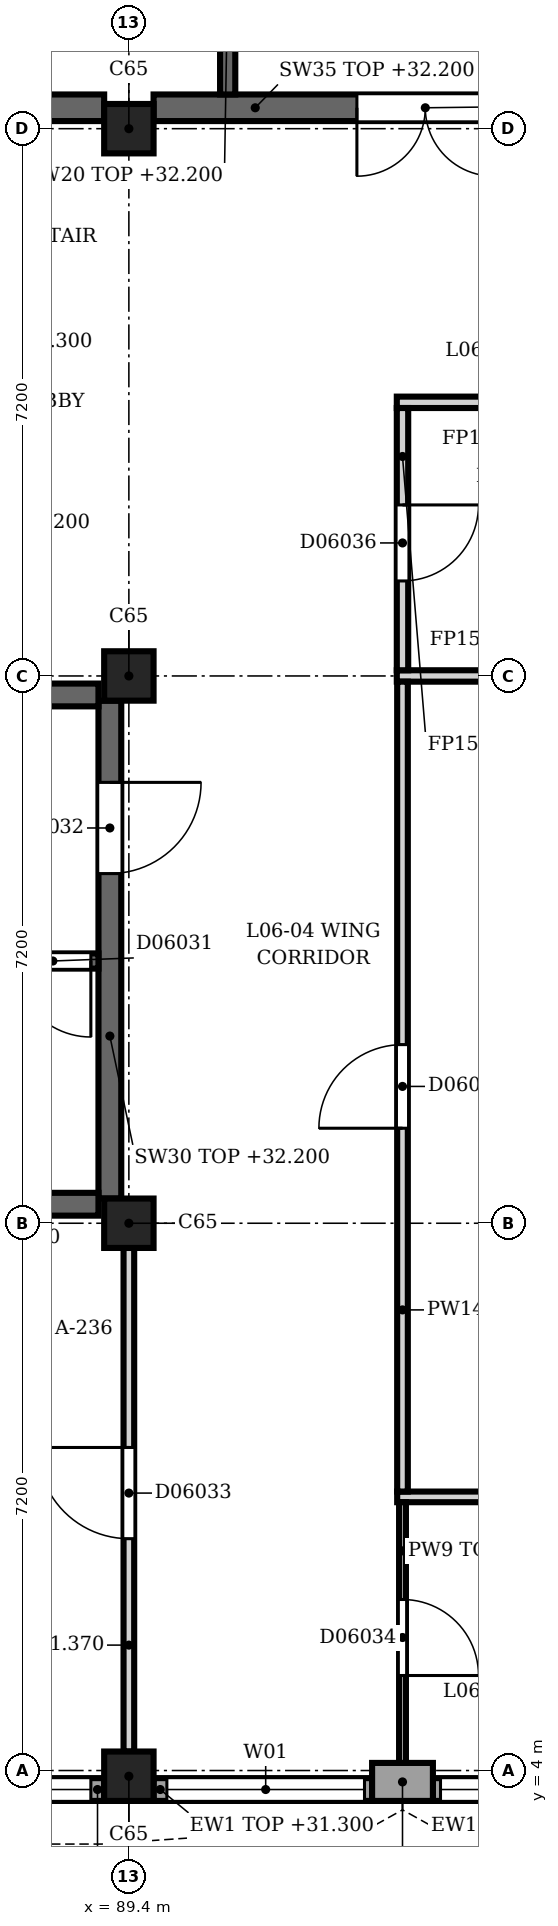
"""IFC4 building model, lengths in metres.
Left out: names, types, materials, properties, quantities, classifications, styles, units other than length and angle.
Written with IfcOpenShell. Run it as: python <this file> out.ifc"""

import sys

from ifc_helpers import new_model, si_unit, direction, frame, frame_2d, origin, origin_2d, place, context, subcontext, project, spatial, rectangle, extrude, element, fill, save


model = new_model("IFC4")
c1 = context("Model", 3, precision=1e-05, world=origin(), true_north=direction((0.0, 1.0)))
c2 = subcontext(c1, "Body", "Model", "MODEL_VIEW")
j1 = project(units=[si_unit("LENGTHUNIT", "METRE"), si_unit("PLANEANGLEUNIT", "RADIAN")], contexts=[c1])
p1 = place(None, origin())
s1 = spatial("IfcSite", under=j1, at=p1, CompositionType="ELEMENT")
p2 = place(p1, origin())
s2 = spatial("IfcBuilding", under=s1, at=p2, CompositionType="ELEMENT")
p3 = place(p2, frame((0.0, 0.0, 27.9)))
s3 = spatial("IfcBuildingStorey", under=s2, at=p3, CompositionType="ELEMENT", Elevation=27.9)
for number, where, z_axis, x_axis in (
    (1, (89.4, 3.925, 0.0), (0.0, 0.0, 1.0), (1.0, 0.0, 0.0)),
    (2, (89.4, 11.2, 0.0), (0.0, 0.0, 1.0), (1.0, 0.0, 0.0)),
    (3, (89.4, 18.4, 0.0), (0.0, 0.0, 1.0), (1.0, 0.0, 0.0)),
    (4, (89.4, 25.6, 0.0), (0.0, 0.0, 1.0), (1.0, 0.0, 0.0)),
):
    element("IfcColumn", number, at=place(p3, frame(where, z_axis=z_axis, x_axis=x_axis)), inside=s3, PredefinedType="COLUMN", context=c2, shape_type="SweptSolid", body=[
        extrude(rectangle(XDim=0.65, YDim=0.65, at=origin_2d()), origin(), (0.0, 0.0, 1.0), 4.5),
    ])
p4 = place(p3, frame((93.4, 3.85, 0.0), z_axis=(0.0, 0.0, 1.0), x_axis=(-1.0, 0.0, 0.0)))
e5 = element("IfcWall", 5, at=p4, inside=s3, PredefinedType="SOLIDWALL", context=c2, shape_type="SweptSolid", body=[
    extrude(rectangle(XDim=0.8, YDim=0.5, at=frame_2d((0.4, 0.0))), origin(), (0.0, 0.0, 1.0), 3.4),
])
p5 = place(p3, frame((96.275, 3.75, 0.0), z_axis=(0.0, 0.0, 1.0), x_axis=(-1.0, 0.0, 0.0)))
e6 = element("IfcWall", 6, at=p5, inside=s3, PredefinedType="SOLIDWALL", context=c2, shape_type="SweptSolid", body=[
    extrude(rectangle(XDim=2.875, YDim=0.3, at=frame_2d((1.438, 0.0))), origin(), (0.0, 0.0, 1.0), 3.4),
])
p6 = place(p5, frame((0.175, 0.0, 0.9)))
e7 = element("IfcOpeningElement", 7, at=p6, cuts=e6, PredefinedType="OPENING", context=c2, shape_type="SweptSolid", body=[
    extrude(rectangle(XDim=2.6, YDim=2.4, at=frame_2d((1.3, 1.2))), frame((0.0, 0.16, 0.0), z_axis=(0.0, -1.0, 0.0), x_axis=(1.0, 0.0, 0.0)), (0.0, 0.0, 1.0), 0.32),
])
p7 = place(p3, frame((92.6, 3.75, 0.0), z_axis=(0.0, 0.0, 1.0), x_axis=(-1.0, 0.0, 0.0)))
e8 = element("IfcWall", 8, at=p7, inside=s3, PredefinedType="SOLIDWALL", context=c2, shape_type="SweptSolid", body=[
    extrude(rectangle(XDim=2.875, YDim=0.3, at=frame_2d((1.438, 0.0))), origin(), (0.0, 0.0, 1.0), 3.4),
])
p8 = place(p7, frame((0.1, 0.0, 0.9)))
e9 = element("IfcOpeningElement", 9, at=p8, cuts=e8, PredefinedType="OPENING", context=c2, shape_type="SweptSolid", body=[
    extrude(rectangle(XDim=2.6, YDim=2.4, at=frame_2d((1.3, 1.2))), frame((0.0, 0.16, 0.0), z_axis=(0.0, -1.0, 0.0), x_axis=(1.0, 0.0, 0.0)), (0.0, 0.0, 1.0), 0.32),
])
p9 = place(p3, frame((89.075, 3.75, 0.0), z_axis=(0.0, 0.0, 1.0), x_axis=(-1.0, 0.0, 0.0)))
e10 = element("IfcWall", 10, at=p9, inside=s3, PredefinedType="SOLIDWALL", context=c2, shape_type="SweptSolid", body=[
    extrude(rectangle(XDim=2.875, YDim=0.3, at=frame_2d((1.438, 0.0))), origin(), (0.0, 0.0, 1.0), 3.4),
])
p10 = place(p9, frame((0.175, 0.0, 0.9)))
e11 = element("IfcOpeningElement", 11, at=p10, cuts=e10, PredefinedType="OPENING", context=c2, shape_type="SweptSolid", body=[
    extrude(rectangle(XDim=2.6, YDim=2.4, at=frame_2d((1.3, 1.2))), frame((0.0, 0.16, 0.0), z_axis=(0.0, -1.0, 0.0), x_axis=(1.0, 0.0, 0.0)), (0.0, 0.0, 1.0), 0.32),
])
p11 = place(p3, frame((82.45, 25.875, 0.0), z_axis=(0.0, 0.0, 1.0), x_axis=(1.0, 0.0, 0.0)))
e12 = element("IfcWall", 12, at=p11, inside=s3, PredefinedType="SHEAR", context=c2, shape_type="SweptSolid", body=[
    extrude(rectangle(XDim=6.625, YDim=0.35, at=frame_2d((3.312, 0.0))), origin(), (0.0, 0.0, 1.0), 4.3),
])
p12 = place(p11, frame((3.95, 0.0, 0.0)))
e13 = element("IfcOpeningElement", 13, at=p12, cuts=e12, PredefinedType="OPENING", context=c2, shape_type="SweptSolid", body=[
    extrude(rectangle(XDim=1.2, YDim=2.1, at=frame_2d((0.6, 1.05))), frame((0.0, 0.185, 0.0), z_axis=(0.0, -1.0, 0.0), x_axis=(1.0, 0.0, 0.0)), (0.0, 0.0, 1.0), 0.37),
])
p13 = place(p3, frame((89.725, 25.875, 0.0), z_axis=(0.0, 0.0, 1.0), x_axis=(1.0, 0.0, 0.0)))
e14 = element("IfcWall", 14, at=p13, inside=s3, PredefinedType="SHEAR", context=c2, shape_type="SweptSolid", body=[
    extrude(rectangle(XDim=6.55, YDim=0.35, at=frame_2d((3.275, 0.0))), origin(), (0.0, 0.0, 1.0), 4.3),
])
p14 = place(p13, frame((2.675, 0.0, 0.0)))
e15 = element("IfcOpeningElement", 15, at=p14, cuts=e14, PredefinedType="OPENING", context=c2, shape_type="SweptSolid", body=[
    extrude(rectangle(XDim=1.8, YDim=2.1, at=frame_2d((0.9, 1.05))), frame((0.0, 0.185, 0.0), z_axis=(0.0, -1.0, 0.0), x_axis=(1.0, 0.0, 0.0)), (0.0, 0.0, 1.0), 0.37),
])
p15 = place(p3, frame((90.7, 26.05, 0.0), z_axis=(0.0, 0.0, 1.0), x_axis=(0.0, 1.0, 0.0)))
e16 = element("IfcWall", 16, at=p15, inside=s3, PredefinedType="SHEAR", context=c2, shape_type="SweptSolid", body=[
    extrude(rectangle(XDim=3.05, YDim=0.2, at=frame_2d((1.525, 0.0))), origin(), (0.0, 0.0, 1.0), 4.3),
])
p16 = place(p3, frame((89.15, 11.525, 0.0), z_axis=(0.0, 0.0, 1.0), x_axis=(0.0, 1.0, 0.0)))
e17 = element("IfcWall", 17, at=p16, inside=s3, PredefinedType="SHEAR", context=c2, shape_type="SweptSolid", body=[
    extrude(rectangle(XDim=6.55, YDim=0.3, at=frame_2d((3.275, 0.0))), origin(), (0.0, 0.0, 1.0), 4.3),
])
p17 = place(p16, frame((4.275, 0.0, 0.0)))
e18 = element("IfcOpeningElement", 18, at=p17, cuts=e17, PredefinedType="OPENING", context=c2, shape_type="SweptSolid", body=[
    extrude(rectangle(XDim=1.2, YDim=2.1, at=frame_2d((0.6, 1.05))), frame((0.0, 0.16, 0.0), z_axis=(0.0, -1.0, 0.0), x_axis=(1.0, 0.0, 0.0)), (0.0, 0.0, 1.0), 0.32),
])
for number, where, z_axis, x_axis in (
    (19, (82.6, 11.45, 0.0), (0.0, 0.0, 1.0), (1.0, 0.0, 0.0)),
    (20, (82.6, 18.15, 0.0), (0.0, 0.0, 1.0), (1.0, 0.0, 0.0)),
):
    element("IfcWall", number, at=place(p3, frame(where, z_axis=z_axis, x_axis=x_axis)), inside=s3, PredefinedType="SHEAR", context=c2, shape_type="SweptSolid", body=[
        extrude(rectangle(XDim=6.4, YDim=0.3, at=frame_2d((3.2, 0.0))), origin(), (0.0, 0.0, 1.0), 4.3),
    ])
p18 = place(p3, frame((89.0, 14.65, 0.0), z_axis=(0.0, 0.0, 1.0), x_axis=(-1.0, 0.0, 0.0)))
e21 = element("IfcWall", 21, at=p18, inside=s3, PredefinedType="SHEAR", context=c2, shape_type="SweptSolid", body=[
    extrude(rectangle(XDim=6.4, YDim=0.2, at=frame_2d((3.2, 0.0))), origin(), (0.0, 0.0, 1.0), 4.3),
])
p19 = place(p18, frame((0.1, 0.0, 0.0)))
e22 = element("IfcOpeningElement", 22, at=p19, cuts=e21, PredefinedType="OPENING", context=c2, shape_type="SweptSolid", body=[
    extrude(rectangle(XDim=1.0, YDim=2.1, at=frame_2d((0.5, 1.05))), frame((0.0, 0.11, 0.0), z_axis=(0.0, -1.0, 0.0), x_axis=(1.0, 0.0, 0.0)), (0.0, 0.0, 1.0), 0.22),
])
p20 = place(p3, frame((92.93, 7.6, 0.0), z_axis=(0.0, 0.0, 1.0), x_axis=(1.0, 0.0, 0.0)))
e23 = element("IfcWall", 23, at=p20, inside=s3, PredefinedType="PARTITIONING", context=c2, shape_type="SweptSolid", body=[
    extrude(rectangle(XDim=3.74, YDim=0.14, at=frame_2d((1.87, 0.0))), origin(), (0.0, 0.0, 1.0), 4.3),
])
p21 = place(p3, frame((92.925, 18.4, 0.0), z_axis=(0.0, 0.0, 1.0), x_axis=(1.0, 0.0, 0.0)))
e24 = element("IfcWall", 24, at=p21, inside=s3, PredefinedType="PARTITIONING", context=c2, shape_type="SweptSolid", body=[
    extrude(rectangle(XDim=3.35, YDim=0.15, at=frame_2d((1.675, 0.0))), origin(), (0.0, 0.0, 1.0), 3.47),
])
p22 = place(p3, frame((92.925, 22.0, 0.0), z_axis=(0.0, 0.0, 1.0), x_axis=(1.0, 0.0, 0.0)))
e25 = element("IfcWall", 25, at=p22, inside=s3, PredefinedType="PARTITIONING", context=c2, shape_type="SweptSolid", body=[
    extrude(rectangle(XDim=3.675, YDim=0.15, at=frame_2d((1.837, 0.0))), origin(), (0.0, 0.0, 1.0), 4.3),
])
p23 = place(p3, frame((89.4, 4.25, 0.0), z_axis=(0.0, 0.0, 1.0), x_axis=(0.0, 1.0, 0.0)))
e26 = element("IfcWall", 26, at=p23, inside=s3, PredefinedType="PARTITIONING", context=c2, shape_type="SweptSolid", body=[
    extrude(rectangle(XDim=6.625, YDim=0.14, at=frame_2d((3.312, 0.0))), origin(), (0.0, 0.0, 1.0), 3.47),
])
p24 = place(p23, frame((2.8, 0.0, 0.0)))
e27 = element("IfcOpeningElement", 27, at=p24, cuts=e26, PredefinedType="OPENING", context=c2, shape_type="SweptSolid", body=[
    extrude(rectangle(XDim=1.2, YDim=2.1, at=frame_2d((0.6, 1.05))), frame((0.0, 0.08, 0.0), z_axis=(0.0, -1.0, 0.0), x_axis=(1.0, 0.0, 0.0)), (0.0, 0.0, 1.0), 0.16),
])
p25 = place(p3, frame((93.0, 7.53, 0.0), z_axis=(0.0, 0.0, 1.0), x_axis=(0.0, -1.0, 0.0)))
e28 = element("IfcWall", 28, at=p25, inside=s3, PredefinedType="PARTITIONING", context=c2, shape_type="SweptSolid", body=[
    extrude(rectangle(XDim=3.43, YDim=0.09, at=frame_2d((1.715, 0.0))), origin(), (0.0, 0.0, 1.0), 3.87),
])
p26 = place(p25, frame((1.28, 0.0, 0.0)))
e29 = element("IfcOpeningElement", 29, at=p26, cuts=e28, PredefinedType="OPENING", context=c2, shape_type="SweptSolid", body=[
    extrude(rectangle(XDim=1.0, YDim=2.2, at=frame_2d((0.5, 1.1))), frame((0.0, 0.055, 0.0), z_axis=(0.0, -1.0, 0.0), x_axis=(1.0, 0.0, 0.0)), (0.0, 0.0, 1.0), 0.11),
])
p27 = place(p3, frame((93.0, 18.325, 0.0), z_axis=(0.0, 0.0, 1.0), x_axis=(0.0, -1.0, 0.0)))
e30 = element("IfcWall", 30, at=p27, inside=s3, PredefinedType="PARTITIONING", context=c2, shape_type="SweptSolid", body=[
    extrude(rectangle(XDim=10.655, YDim=0.14, at=frame_2d((5.328, 0.0))), origin(), (0.0, 0.0, 1.0), 3.87),
])
p28 = place(p27, frame((4.775, 0.0, 0.0)))
e31 = element("IfcOpeningElement", 31, at=p28, cuts=e30, PredefinedType="OPENING", context=c2, shape_type="SweptSolid", body=[
    extrude(rectangle(XDim=1.1, YDim=2.2, at=frame_2d((0.55, 1.1))), frame((0.0, 0.08, 0.0), z_axis=(0.0, -1.0, 0.0), x_axis=(1.0, 0.0, 0.0)), (0.0, 0.0, 1.0), 0.16),
])
p29 = place(p3, frame((93.0, 21.925, 0.0), z_axis=(0.0, 0.0, 1.0), x_axis=(0.0, -1.0, 0.0)))
e32 = element("IfcWall", 32, at=p29, inside=s3, PredefinedType="PARTITIONING", context=c2, shape_type="SweptSolid", body=[
    extrude(rectangle(XDim=3.45, YDim=0.15, at=frame_2d((1.725, 0.0))), origin(), (0.0, 0.0, 1.0), 4.3),
])
p30 = place(p29, frame((1.275, 0.0, 0.0)))
e33 = element("IfcOpeningElement", 33, at=p30, cuts=e32, PredefinedType="OPENING", context=c2, shape_type="SweptSolid", body=[
    extrude(rectangle(XDim=1.0, YDim=2.1, at=frame_2d((0.5, 1.05))), frame((0.0, 0.085, 0.0), z_axis=(0.0, -1.0, 0.0), x_axis=(1.0, 0.0, 0.0)), (0.0, 0.0, 1.0), 0.17),
])
p31 = place(p6, origin())
e34 = element("IfcWindow", 34, at=p31, inside=s3, PartitioningType="SINGLE_PANEL", PredefinedType="WINDOW", context=c2, shape_type="SweptSolid", body=[
    extrude(rectangle(XDim=2.6, YDim=2.4, at=frame_2d((1.3, 1.2))), frame((0.0, 0.03, 0.0), z_axis=(0.0, -1.0, 0.0), x_axis=(1.0, 0.0, 0.0)), (0.0, 0.0, 1.0), 0.06),
])
fill(e7, e34)
p32 = place(p8, origin())
e35 = element("IfcWindow", 35, at=p32, inside=s3, PartitioningType="SINGLE_PANEL", PredefinedType="WINDOW", context=c2, shape_type="SweptSolid", body=[
    extrude(rectangle(XDim=2.6, YDim=2.4, at=frame_2d((1.3, 1.2))), frame((0.0, 0.03, 0.0), z_axis=(0.0, -1.0, 0.0), x_axis=(1.0, 0.0, 0.0)), (0.0, 0.0, 1.0), 0.06),
])
fill(e9, e35)
p33 = place(p10, origin())
e36 = element("IfcWindow", 36, at=p33, inside=s3, PartitioningType="SINGLE_PANEL", PredefinedType="WINDOW", context=c2, shape_type="SweptSolid", body=[
    extrude(rectangle(XDim=2.6, YDim=2.4, at=frame_2d((1.3, 1.2))), frame((0.0, 0.03, 0.0), z_axis=(0.0, -1.0, 0.0), x_axis=(1.0, 0.0, 0.0)), (0.0, 0.0, 1.0), 0.06),
])
fill(e11, e36)
p34 = place(p14, origin())
e37 = element("IfcDoor", 37, at=p34, inside=s3, OperationType="SINGLE_SWING_LEFT", PredefinedType="DOOR", context=c2, shape_type="SweptSolid", body=[
    extrude(rectangle(XDim=1.8, YDim=2.1, at=frame_2d((0.9, 1.05))), frame((0.0, 0.025, 0.0), z_axis=(0.0, -1.0, 0.0), x_axis=(1.0, 0.0, 0.0)), (0.0, 0.0, 1.0), 0.05),
])
fill(e15, e37)
p35 = place(p17, origin())
e38 = element("IfcDoor", 38, at=p35, inside=s3, OperationType="SINGLE_SWING_RIGHT", PredefinedType="DOOR", context=c2, shape_type="SweptSolid", body=[
    extrude(rectangle(XDim=1.2, YDim=2.1, at=frame_2d((0.6, 1.05))), frame((0.0, 0.025, 0.0), z_axis=(0.0, -1.0, 0.0), x_axis=(1.0, 0.0, 0.0)), (0.0, 0.0, 1.0), 0.05),
])
fill(e18, e38)
p36 = place(p19, origin())
e39 = element("IfcDoor", 39, at=p36, inside=s3, OperationType="SINGLE_SWING_LEFT", PredefinedType="DOOR", context=c2, shape_type="SweptSolid", body=[
    extrude(rectangle(XDim=1.0, YDim=2.1, at=frame_2d((0.5, 1.05))), frame((0.0, 0.025, 0.0), z_axis=(0.0, -1.0, 0.0), x_axis=(1.0, 0.0, 0.0)), (0.0, 0.0, 1.0), 0.05),
])
fill(e22, e39)
p37 = place(p24, origin())
e40 = element("IfcDoor", 40, at=p37, inside=s3, OperationType="SINGLE_SWING_RIGHT", PredefinedType="DOOR", context=c2, shape_type="SweptSolid", body=[
    extrude(rectangle(XDim=1.2, YDim=2.1, at=frame_2d((0.6, 1.05))), frame((0.0, 0.025, 0.0), z_axis=(0.0, -1.0, 0.0), x_axis=(1.0, 0.0, 0.0)), (0.0, 0.0, 1.0), 0.05),
])
fill(e27, e40)
p38 = place(p26, origin())
e41 = element("IfcDoor", 41, at=p38, inside=s3, OperationType="SINGLE_SWING_RIGHT", PredefinedType="DOOR", context=c2, shape_type="SweptSolid", body=[
    extrude(rectangle(XDim=1.0, YDim=2.2, at=frame_2d((0.5, 1.1))), frame((0.0, 0.025, 0.0), z_axis=(0.0, -1.0, 0.0), x_axis=(1.0, 0.0, 0.0)), (0.0, 0.0, 1.0), 0.05),
])
fill(e29, e41)
p39 = place(p28, origin())
e42 = element("IfcDoor", 42, at=p39, inside=s3, OperationType="SINGLE_SWING_LEFT", PredefinedType="DOOR", context=c2, shape_type="SweptSolid", body=[
    extrude(rectangle(XDim=1.1, YDim=2.2, at=frame_2d((0.55, 1.1))), frame((0.0, 0.025, 0.0), z_axis=(0.0, -1.0, 0.0), x_axis=(1.0, 0.0, 0.0)), (0.0, 0.0, 1.0), 0.05),
])
fill(e31, e42)
p40 = place(p30, origin())
e43 = element("IfcDoor", 43, at=p40, inside=s3, OperationType="SINGLE_SWING_RIGHT", PredefinedType="DOOR", context=c2, shape_type="SweptSolid", body=[
    extrude(rectangle(XDim=1.0, YDim=2.1, at=frame_2d((0.5, 1.05))), frame((0.0, 0.025, 0.0), z_axis=(0.0, -1.0, 0.0), x_axis=(1.0, 0.0, 0.0)), (0.0, 0.0, 1.0), 0.05),
])
fill(e33, e43)
save(model, sys.argv[1])
